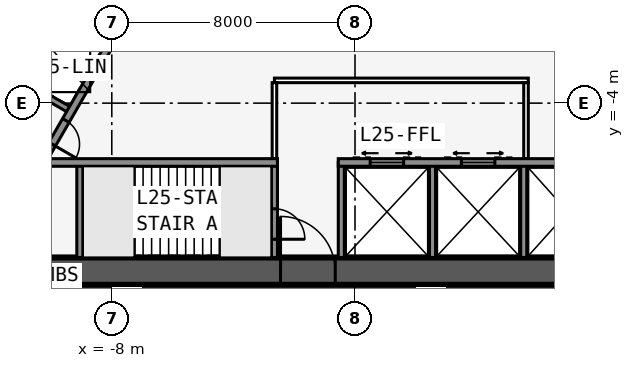
"""IFC4 building model, lengths in metres.
Left out: names, types, materials, properties, quantities, classifications, styles, units other than length and angle.
Written with IfcOpenShell. Run it as: python <this file> out.ifc"""

import sys

from ifc_helpers import new_model, si_unit, direction, frame, frame_2d, origin, place, context, subcontext, project, spatial, rectangle, extrude, element, fill, save


model = new_model("IFC4")
c1 = context("Model", 3, precision=1e-05, world=origin(), true_north=direction((0.0, 1.0)))
c2 = subcontext(c1, "Body", "Model", "MODEL_VIEW")
j1 = project(units=[si_unit("LENGTHUNIT", "METRE"), si_unit("PLANEANGLEUNIT", "RADIAN")], contexts=[c1])
p1 = place(None, origin())
s1 = spatial("IfcSite", under=j1, at=p1, CompositionType="ELEMENT")
p2 = place(p1, origin())
s2 = spatial("IfcBuilding", under=s1, at=p2, CompositionType="ELEMENT")
p3 = place(p2, frame((0.0, 0.0, 96.5)))
s3 = spatial("IfcBuildingStorey", under=s2, at=p3, CompositionType="ELEMENT", Elevation=96.5)
p4 = place(p3, frame((-16.5, -9.526, 0.0), z_axis=(0.0, 0.0, 1.0), x_axis=(1.0, 0.0, 0.0)))
e1 = element("IfcWall", 1, at=p4, inside=s3, PredefinedType="SHEAR", context=c2, shape_type="SweptSolid", body=[
    extrude(rectangle(XDim=33.0, YDim=0.9, at=frame_2d((16.5, 0.0))), origin(), (0.0, 0.0, 1.0), 3.4),
])
p5 = place(p4, frame((14.05, 0.0, 0.0)))
e2 = element("IfcOpeningElement", 2, at=p5, cuts=e1, PredefinedType="OPENING", context=c2, shape_type="SweptSolid", body=[
    extrude(rectangle(XDim=1.8, YDim=2.13, at=frame_2d((0.9, 1.065))), frame((0.0, 0.46, 0.0), z_axis=(0.0, -1.0, 0.0), x_axis=(1.0, 0.0, 0.0)), (0.0, 0.0, 1.0), 0.92),
])
p6 = place(p3, frame((-10.183, -5.951, 0.0), z_axis=(0.0, 0.0, 1.0), x_axis=(1.0, 0.0, 0.0)))
e3 = element("IfcWall", 3, at=p6, inside=s3, PredefinedType="SOLIDWALL", context=c2, shape_type="SweptSolid", body=[
    extrude(rectangle(XDim=7.633, YDim=0.25, at=frame_2d((3.816, 0.0))), origin(), (0.0, 0.0, 1.0), 3.235),
])
p7 = place(p3, frame((-0.55, -5.951, 0.0), z_axis=(0.0, 0.0, 1.0), x_axis=(1.0, 0.0, 0.0)))
e4 = element("IfcWall", 4, at=p7, inside=s3, PredefinedType="SOLIDWALL", context=c2, shape_type="SweptSolid", body=[
    extrude(rectangle(XDim=10.733, YDim=0.25, at=frame_2d((5.366, 0.0))), origin(), (0.0, 0.0, 1.0), 3.235),
])
p8 = place(p7, frame((9.314, 0.0, 0.0)))
e5 = element("IfcOpeningElement", 5, at=p8, cuts=e4, PredefinedType="OPENING", context=c2, shape_type="SweptSolid", body=[
    extrude(rectangle(XDim=0.9, YDim=2.13, at=frame_2d((0.45, 1.065))), frame((0.0, 0.135, 0.0), z_axis=(0.0, -1.0, 0.0), x_axis=(1.0, 0.0, 0.0)), (0.0, 0.0, 1.0), 0.27),
])
p9 = place(p7, frame((1.05, 0.0, 0.0)))
e6 = element("IfcOpeningElement", 6, at=p9, cuts=e4, PredefinedType="OPENING", context=c2, shape_type="SweptSolid", body=[
    extrude(rectangle(XDim=1.1, YDim=2.13, at=frame_2d((0.55, 1.065))), frame((0.0, 0.135, 0.0), z_axis=(0.0, -1.0, 0.0), x_axis=(1.0, 0.0, 0.0)), (0.0, 0.0, 1.0), 0.27),
])
p10 = place(p7, frame((4.05, 0.0, 0.0)))
e7 = element("IfcOpeningElement", 7, at=p10, cuts=e4, PredefinedType="OPENING", context=c2, shape_type="SweptSolid", body=[
    extrude(rectangle(XDim=1.1, YDim=2.13, at=frame_2d((0.55, 1.065))), frame((0.0, 0.135, 0.0), z_axis=(0.0, -1.0, 0.0), x_axis=(1.0, 0.0, 0.0)), (0.0, 0.0, 1.0), 0.27),
])
p11 = place(p3, frame((-9.05, -5.951, 0.0), z_axis=(0.0, 0.0, 1.0), x_axis=(0.0, -1.0, 0.0)))
e8 = element("IfcWall", 8, at=p11, inside=s3, PredefinedType="SOLIDWALL", context=c2, shape_type="SweptSolid", body=[
    extrude(rectangle(XDim=3.125, YDim=0.2, at=frame_2d((1.562, 0.0))), origin(), (0.0, 0.0, 1.0), 3.235),
])
p12 = place(p3, frame((-2.65, -5.951, 0.0), z_axis=(0.0, 0.0, 1.0), x_axis=(0.0, -1.0, 0.0)))
e9 = element("IfcWall", 9, at=p12, inside=s3, PredefinedType="SOLIDWALL", context=c2, shape_type="SweptSolid", body=[
    extrude(rectangle(XDim=3.125, YDim=0.2, at=frame_2d((1.562, 0.0))), origin(), (0.0, 0.0, 1.0), 3.235),
])
p13 = place(p12, frame((1.525, 0.0, 0.0)))
e10 = element("IfcOpeningElement", 10, at=p13, cuts=e9, PredefinedType="OPENING", context=c2, shape_type="SweptSolid", body=[
    extrude(rectangle(XDim=1.0, YDim=2.13, at=frame_2d((0.5, 1.065))), frame((0.0, 0.11, 0.0), z_axis=(0.0, -1.0, 0.0), x_axis=(1.0, 0.0, 0.0)), (0.0, 0.0, 1.0), 0.22),
])
for number, where, z_axis, x_axis in (
    (11, (-0.45, -5.951, 0.0), (0.0, 0.0, 1.0), (0.0, -1.0, 0.0)),
    (12, (2.55, -5.951, 0.0), (0.0, 0.0, 1.0), (0.0, -1.0, 0.0)),
    (13, (5.55, -5.951, 0.0), (0.0, 0.0, 1.0), (0.0, -1.0, 0.0)),
):
    element("IfcWall", number, at=place(p3, frame(where, z_axis=z_axis, x_axis=x_axis)), inside=s3, PredefinedType="SOLIDWALL", context=c2, shape_type="SweptSolid", body=[
        extrude(rectangle(XDim=3.125, YDim=0.2, at=frame_2d((1.562, 0.0))), origin(), (0.0, 0.0, 1.0), 3.235),
    ])
p14 = place(p3, frame((16.5, -9.526, 0.0), z_axis=(0.0, 0.0, 1.0), x_axis=(-0.499999749417, 0.866025548458, 0.0)))
e14 = element("IfcWall", 14, at=p14, inside=s3, PredefinedType="SHEAR", context=c2, shape_type="SweptSolid", body=[
    extrude(rectangle(XDim=33.0, YDim=0.9, at=frame_2d((16.5, 0.0))), origin(), (0.0, 0.0, 1.0), 3.4),
])
p15 = place(p14, frame((14.15, 0.0, 0.0)))
e15 = element("IfcOpeningElement", 15, at=p15, cuts=e14, PredefinedType="OPENING", context=c2, shape_type="SweptSolid", body=[
    extrude(rectangle(XDim=1.8, YDim=2.13, at=frame_2d((0.9, 1.065))), frame((0.0, 0.46, 0.0), z_axis=(0.0, -1.0, 0.0), x_axis=(1.0, 0.0, 0.0)), (0.0, 0.0, 1.0), 0.92),
])
p16 = place(p14, frame((12.6, 0.0, 0.0)))
e16 = element("IfcOpeningElement", 16, at=p16, cuts=e14, PredefinedType="OPENING", context=c2, shape_type="SweptSolid", body=[
    extrude(rectangle(XDim=1.0, YDim=2.13, at=frame_2d((0.5, 1.065))), frame((0.0, 0.46, 0.0), z_axis=(0.0, -1.0, 0.0), x_axis=(1.0, 0.0, 0.0)), (0.0, 0.0, 1.0), 0.92),
])
p17 = place(p3, frame((10.245, -5.843, 0.0), z_axis=(0.0, 0.0, 1.0), x_axis=(-0.499993009313, 0.866029439822, 0.0)))
e17 = element("IfcWall", 17, at=p17, inside=s3, PredefinedType="SOLIDWALL", context=c2, shape_type="SweptSolid", body=[
    extrude(rectangle(XDim=7.733, YDim=0.25, at=frame_2d((3.866, 0.0))), origin(), (0.0, 0.0, 1.0), 3.235),
])
p18 = place(p3, frame((0.0, 19.052, 0.0), z_axis=(0.0, 0.0, 1.0), x_axis=(-0.499999749417, -0.866025548458, 0.0)))
e18 = element("IfcWall", 18, at=p18, inside=s3, PredefinedType="SHEAR", context=c2, shape_type="SweptSolid", body=[
    extrude(rectangle(XDim=33.0, YDim=0.9, at=frame_2d((16.5, 0.0))), origin(), (0.0, 0.0, 1.0), 3.4),
])
p19 = place(p18, frame((14.15, 0.0, 0.0)))
e19 = element("IfcOpeningElement", 19, at=p19, cuts=e18, PredefinedType="OPENING", context=c2, shape_type="SweptSolid", body=[
    extrude(rectangle(XDim=1.8, YDim=2.13, at=frame_2d((0.9, 1.065))), frame((0.0, 0.46, 0.0), z_axis=(0.0, -1.0, 0.0), x_axis=(1.0, 0.0, 0.0)), (0.0, 0.0, 1.0), 0.92),
])
p20 = place(p18, frame((12.6, 0.0, 0.0)))
e20 = element("IfcOpeningElement", 20, at=p20, cuts=e18, PredefinedType="OPENING", context=c2, shape_type="SweptSolid", body=[
    extrude(rectangle(XDim=1.0, YDim=2.13, at=frame_2d((0.5, 1.065))), frame((0.0, 0.46, 0.0), z_axis=(0.0, -1.0, 0.0), x_axis=(1.0, 0.0, 0.0)), (0.0, 0.0, 1.0), 0.92),
])
p21 = place(p3, frame((-4.929, 3.365, 0.0), z_axis=(0.0, 0.0, 1.0), x_axis=(-0.499991433582, -0.866030349552, 0.0)))
e21 = element("IfcWall", 21, at=p21, inside=s3, PredefinedType="SOLIDWALL", context=c2, shape_type="SweptSolid", body=[
    extrude(rectangle(XDim=10.633, YDim=0.25, at=frame_2d((5.316, 0.0))), origin(), (0.0, 0.0, 1.0), 3.235),
])
p22 = place(p21, frame((9.164, 0.0, 0.0)))
e22 = element("IfcOpeningElement", 22, at=p22, cuts=e21, PredefinedType="OPENING", context=c2, shape_type="SweptSolid", body=[
    extrude(rectangle(XDim=0.9, YDim=2.13, at=frame_2d((0.45, 1.065))), frame((0.0, 0.135, 0.0), z_axis=(0.0, -1.0, 0.0), x_axis=(1.0, 0.0, 0.0)), (0.0, 0.0, 1.0), 0.27),
])
p23 = place(p3, frame((-9.329, -4.256, 0.0), z_axis=(0.0, 0.0, 1.0), x_axis=(-0.866022959057, 0.500004234368, 0.0)))
e23 = element("IfcWall", 23, at=p23, inside=s3, PredefinedType="SOLIDWALL", context=c2, shape_type="SweptSolid", body=[
    extrude(rectangle(XDim=3.125, YDim=0.2, at=frame_2d((1.562, 0.0))), origin(), (0.0, 0.0, 1.0), 3.235),
])
p24 = place(p3, frame((20.027, -10.985, 0.0), z_axis=(0.0, 0.0, 1.0), x_axis=(-0.500001677587, 0.866024435227, 0.0)))
e24 = element("IfcWall", 24, at=p24, inside=s3, PredefinedType="PARTITIONING", context=c2, shape_type="SweptSolid", body=[
    extrude(rectangle(XDim=39.054, YDim=0.15, at=frame_2d((19.527, 0.0))), origin(), (0.0, 0.0, 1.0), 3.235),
])
p25 = place(p24, frame((1.558, 0.0, 0.0)))
e25 = element("IfcOpeningElement", 25, at=p25, cuts=e24, PredefinedType="OPENING", context=c2, shape_type="SweptSolid", body=[
    extrude(rectangle(XDim=0.95, YDim=2.13, at=frame_2d((0.475, 1.065))), frame((0.0, 0.085, 0.0), z_axis=(0.0, -1.0, 0.0), x_axis=(1.0, 0.0, 0.0)), (0.0, 0.0, 1.0), 0.17),
])
p26 = place(p24, frame((11.552, 0.0, 0.0)))
e26 = element("IfcOpeningElement", 26, at=p26, cuts=e24, PredefinedType="OPENING", context=c2, shape_type="SweptSolid", body=[
    extrude(rectangle(XDim=0.95, YDim=2.13, at=frame_2d((0.475, 1.065))), frame((0.0, 0.085, 0.0), z_axis=(0.0, -1.0, 0.0), x_axis=(1.0, 0.0, 0.0)), (0.0, 0.0, 1.0), 0.17),
])
p27 = place(p24, frame((22.752, 0.0, 0.0)))
e27 = element("IfcOpeningElement", 27, at=p27, cuts=e24, PredefinedType="OPENING", context=c2, shape_type="SweptSolid", body=[
    extrude(rectangle(XDim=0.95, YDim=2.13, at=frame_2d((0.475, 1.065))), frame((0.0, 0.085, 0.0), z_axis=(0.0, -1.0, 0.0), x_axis=(1.0, 0.0, 0.0)), (0.0, 0.0, 1.0), 0.17),
])
p28 = place(p24, frame((36.546, 0.0, 0.0)))
e28 = element("IfcOpeningElement", 28, at=p28, cuts=e24, PredefinedType="OPENING", context=c2, shape_type="SweptSolid", body=[
    extrude(rectangle(XDim=0.95, YDim=2.13, at=frame_2d((0.475, 1.065))), frame((0.0, 0.085, 0.0), z_axis=(0.0, -1.0, 0.0), x_axis=(1.0, 0.0, 0.0)), (0.0, 0.0, 1.0), 0.17),
])
p29 = place(p3, frame((-0.5, 24.636, 0.0), z_axis=(0.0, 0.0, 1.0), x_axis=(-0.500001915564, -0.86602429783, 0.0)))
e29 = element("IfcWall", 29, at=p29, inside=s3, PredefinedType="PARTITIONING", context=c2, shape_type="SweptSolid", body=[
    extrude(rectangle(XDim=42.172, YDim=0.15, at=frame_2d((21.086, 0.0))), origin(), (0.0, 0.0, 1.0), 3.235),
])
p30 = place(p29, frame((1.911, 0.0, 0.0)))
e30 = element("IfcOpeningElement", 30, at=p30, cuts=e29, PredefinedType="OPENING", context=c2, shape_type="SweptSolid", body=[
    extrude(rectangle(XDim=0.95, YDim=2.13, at=frame_2d((0.475, 1.065))), frame((0.0, 0.085, 0.0), z_axis=(0.0, -1.0, 0.0), x_axis=(1.0, 0.0, 0.0)), (0.0, 0.0, 1.0), 0.17),
])
p31 = place(p29, frame((8.111, 0.0, 0.0)))
e31 = element("IfcOpeningElement", 31, at=p31, cuts=e29, PredefinedType="OPENING", context=c2, shape_type="SweptSolid", body=[
    extrude(rectangle(XDim=0.95, YDim=2.13, at=frame_2d((0.475, 1.065))), frame((0.0, 0.085, 0.0), z_axis=(0.0, -1.0, 0.0), x_axis=(1.0, 0.0, 0.0)), (0.0, 0.0, 1.0), 0.17),
])
p32 = place(p29, frame((18.111, 0.0, 0.0)))
e32 = element("IfcOpeningElement", 32, at=p32, cuts=e29, PredefinedType="OPENING", context=c2, shape_type="SweptSolid", body=[
    extrude(rectangle(XDim=0.95, YDim=2.13, at=frame_2d((0.475, 1.065))), frame((0.0, 0.085, 0.0), z_axis=(0.0, -1.0, 0.0), x_axis=(1.0, 0.0, 0.0)), (0.0, 0.0, 1.0), 0.17),
])
p33 = place(p29, frame((28.711, 0.0, 0.0)))
e33 = element("IfcOpeningElement", 33, at=p33, cuts=e29, PredefinedType="OPENING", context=c2, shape_type="SweptSolid", body=[
    extrude(rectangle(XDim=0.95, YDim=2.13, at=frame_2d((0.475, 1.065))), frame((0.0, 0.085, 0.0), z_axis=(0.0, -1.0, 0.0), x_axis=(1.0, 0.0, 0.0)), (0.0, 0.0, 1.0), 0.17),
])
p34 = place(p29, frame((33.711, 0.0, 0.0)))
e34 = element("IfcOpeningElement", 34, at=p34, cuts=e29, PredefinedType="OPENING", context=c2, shape_type="SweptSolid", body=[
    extrude(rectangle(XDim=0.95, YDim=2.13, at=frame_2d((0.475, 1.065))), frame((0.0, 0.085, 0.0), z_axis=(0.0, -1.0, 0.0), x_axis=(1.0, 0.0, 0.0)), (0.0, 0.0, 1.0), 0.17),
])
p35 = place(p29, frame((39.311, 0.0, 0.0)))
e35 = element("IfcOpeningElement", 35, at=p35, cuts=e29, PredefinedType="OPENING", context=c2, shape_type="SweptSolid", body=[
    extrude(rectangle(XDim=0.95, YDim=2.13, at=frame_2d((0.475, 1.065))), frame((0.0, 0.085, 0.0), z_axis=(0.0, -1.0, 0.0), x_axis=(1.0, 0.0, 0.0)), (0.0, 0.0, 1.0), 0.17),
])
p36 = place(p3, frame((-2.65, -3.251, 0.0), z_axis=(0.0, 0.0, 1.0), x_axis=(1.0, 0.0, 0.0)))
e36 = element("IfcWall", 36, at=p36, inside=s3, PredefinedType="PARTITIONING", context=c2, shape_type="SweptSolid", body=[
    extrude(rectangle(XDim=8.35, YDim=0.15, at=frame_2d((4.175, 0.0))), origin(), (0.0, 0.0, 1.0), 3.235),
])
for number, where, z_axis, x_axis in (
    (37, (-2.65, -5.826, 0.0), (0.0, 0.0, 1.0), (0.0, 1.0, 0.0)),
    (38, (5.625, -5.826, 0.0), (0.0, 0.0, 1.0), (0.0, 1.0, 0.0)),
):
    element("IfcWall", number, at=place(p3, frame(where, z_axis=z_axis, x_axis=x_axis)), inside=s3, PredefinedType="PARTITIONING", context=c2, shape_type="SweptSolid", body=[
        extrude(rectangle(XDim=2.5, YDim=0.15, at=frame_2d((1.25, 0.0))), origin(), (0.0, 0.0, 1.0), 3.235),
    ])
p37 = place(p3, frame((-7.247, -7.576, 0.0), z_axis=(0.0, 0.0, 1.0), x_axis=(1.0, 0.0, 0.0)))
e39 = element("IfcWall", 39, at=p37, inside=s3, PredefinedType="SOLIDWALL", context=c2, shape_type="SweptSolid", body=[
    extrude(rectangle(XDim=2.794, YDim=0.1, at=frame_2d((1.397, 0.0))), origin(), (0.0, 0.0, 1.0), 3.4),
])
p38 = place(p5, origin())
e40 = element("IfcDoor", 40, at=p38, inside=s3, OperationType="DOUBLE_DOOR_SINGLE_SWING", PredefinedType="DOOR", context=c2, shape_type="SweptSolid", body=[
    extrude(rectangle(XDim=1.8, YDim=2.13, at=frame_2d((0.9, 1.065))), frame((0.0, 0.025, 0.0), z_axis=(0.0, -1.0, 0.0), x_axis=(1.0, 0.0, 0.0)), (0.0, 0.0, 1.0), 0.05),
])
fill(e2, e40)
p39 = place(p13, origin())
e41 = element("IfcDoor", 41, at=p39, inside=s3, OperationType="SINGLE_SWING_RIGHT", PredefinedType="DOOR", context=c2, shape_type="SweptSolid", body=[
    extrude(rectangle(XDim=1.0, YDim=2.13, at=frame_2d((0.5, 1.065))), frame((0.0, 0.025, 0.0), z_axis=(0.0, -1.0, 0.0), x_axis=(1.0, 0.0, 0.0)), (0.0, 0.0, 1.0), 0.05),
])
fill(e10, e41)
p40 = place(p22, origin())
e42 = element("IfcDoor", 42, at=p40, inside=s3, OperationType="SINGLE_SWING_RIGHT", PredefinedType="DOOR", context=c2, shape_type="SweptSolid", body=[
    extrude(rectangle(XDim=0.9, YDim=2.13, at=frame_2d((0.45, 1.065))), frame((0.0, 0.025, 0.0), z_axis=(0.0, -1.0, 0.0), x_axis=(1.0, 0.0, 0.0)), (0.0, 0.0, 1.0), 0.05),
])
fill(e22, e42)
p41 = place(p9, origin())
e43 = element("IfcDoor", 43, at=p41, inside=s3, OperationType="DOUBLE_DOOR_SLIDING", PredefinedType="USERDEFINED", context=c2, shape_type="SweptSolid", body=[
    extrude(rectangle(XDim=1.1, YDim=2.13, at=frame_2d((0.55, 1.065))), frame((0.0, 0.025, 0.0), z_axis=(0.0, -1.0, 0.0), x_axis=(1.0, 0.0, 0.0)), (0.0, 0.0, 1.0), 0.05),
])
fill(e6, e43)
p42 = place(p10, origin())
e44 = element("IfcDoor", 44, at=p42, inside=s3, OperationType="DOUBLE_DOOR_SLIDING", PredefinedType="USERDEFINED", context=c2, shape_type="SweptSolid", body=[
    extrude(rectangle(XDim=1.1, YDim=2.13, at=frame_2d((0.55, 1.065))), frame((0.0, 0.025, 0.0), z_axis=(0.0, -1.0, 0.0), x_axis=(1.0, 0.0, 0.0)), (0.0, 0.0, 1.0), 0.05),
])
fill(e7, e44)
save(model, sys.argv[1])
